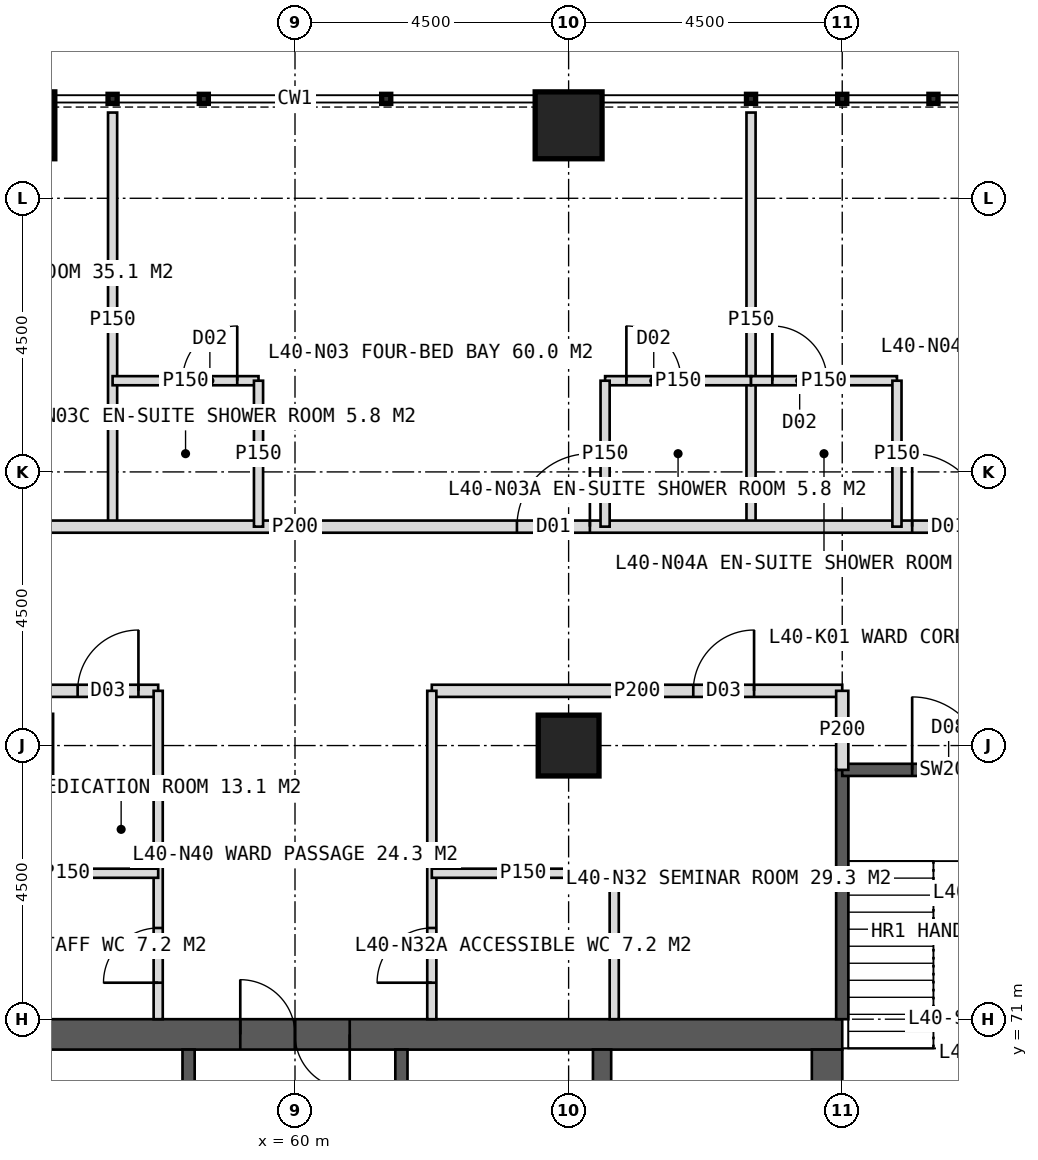
"""IFC4 building model, lengths in metres.
Left out: names, types, materials, properties, quantities, classifications, styles, units other than length and angle.
Written with IfcOpenShell. Run it as: python <this file> out.ifc"""

import sys

from ifc_helpers import new_model, si_unit, direction, frame, frame_2d, origin, origin_2d, place, context, subcontext, project, spatial, rectangle, hollow_rectangle, extrude, element, fill, save


model = new_model("IFC4")
c1 = context("Model", 3, precision=1e-05, world=origin(), true_north=direction((0.0, 1.0)))
c2 = subcontext(c1, "Body", "Model", "MODEL_VIEW")
j1 = project(units=[si_unit("LENGTHUNIT", "METRE"), si_unit("PLANEANGLEUNIT", "RADIAN")], contexts=[c1])
p1 = place(None, origin())
s1 = spatial("IfcSite", under=j1, at=p1, CompositionType="ELEMENT")
p2 = place(p1, origin())
s2 = spatial("IfcBuilding", under=s1, at=p2, CompositionType="ELEMENT")
p3 = place(p2, frame((0.0, 0.0, 168.0)))
s3 = spatial("IfcBuildingStorey", under=s2, at=p3, CompositionType="ELEMENT", Elevation=168.0)
p4 = place(p3, frame((51.0, 70.75, 0.0), z_axis=(0.0, 0.0, 1.0), x_axis=(1.0, 0.0, 0.0)))
e1 = element("IfcWall", 1, at=p4, inside=s3, PredefinedType="SHEAR", context=c2, shape_type="SweptSolid", body=[
    extrude(rectangle(XDim=18.0, YDim=0.5, at=frame_2d((9.0, 0.0))), origin(), (0.0, 0.0, 1.0), 4.0),
])
p5 = place(p4, frame((8.1, 0.0, 0.0)))
e2 = element("IfcOpeningElement", 2, at=p5, cuts=e1, PredefinedType="OPENING", context=c2, shape_type="SweptSolid", body=[
    extrude(rectangle(XDim=1.8, YDim=2.2, at=frame_2d((0.9, 1.1))), frame((0.0, 0.26, 0.0), z_axis=(0.0, -1.0, 0.0), x_axis=(1.0, 0.0, 0.0)), (0.0, 0.0, 1.0), 0.52),
])
p6 = place(p3, frame((68.75, 53.5, 0.0), z_axis=(0.0, 0.0, 1.0), x_axis=(0.0, 1.0, 0.0)))
e3 = element("IfcWall", 3, at=p6, inside=s3, PredefinedType="SHEAR", context=c2, shape_type="SweptSolid", body=[
    extrude(rectangle(XDim=17.0, YDim=0.5, at=frame_2d((8.5, 0.0))), origin(), (0.0, 0.0, 1.0), 4.0),
])
p7 = place(p6, frame((9.5, 0.0, 0.0)))
e4 = element("IfcOpeningElement", 4, at=p7, cuts=e3, PredefinedType="OPENING", context=c2, shape_type="SweptSolid", body=[
    extrude(rectangle(XDim=1.5, YDim=2.2, at=frame_2d((0.75, 1.1))), frame((0.0, 0.26, 0.0), z_axis=(0.0, -1.0, 0.0), x_axis=(1.0, 0.0, 0.0)), (0.0, 0.0, 1.0), 0.52),
])
p8 = place(p3, frame((65.05, 53.5, 0.0), z_axis=(0.0, 0.0, 1.0), x_axis=(0.0, 1.0, 0.0)))
e5 = element("IfcWall", 5, at=p8, inside=s3, PredefinedType="SHEAR", context=c2, shape_type="SweptSolid", body=[
    extrude(rectangle(XDim=17.0, YDim=0.3, at=frame_2d((8.5, 0.0))), origin(), (0.0, 0.0, 1.0), 4.0),
])
p9 = place(p3, frame((58.25, 53.5, 0.0), z_axis=(0.0, 0.0, 1.0), x_axis=(0.0, 1.0, 0.0)))
e6 = element("IfcWall", 6, at=p9, inside=s3, PredefinedType="SHEAR", context=c2, shape_type="SweptSolid", body=[
    extrude(rectangle(XDim=17.0, YDim=0.2, at=frame_2d((8.5, 0.0))), origin(), (0.0, 0.0, 1.0), 4.0),
])
p10 = place(p9, frame((1.375, 0.0, 0.0)))
e7 = element("IfcOpeningElement", 7, at=p10, cuts=e6, PredefinedType="OPENING", context=c2, shape_type="SweptSolid", body=[
    extrude(rectangle(XDim=1.4, YDim=2.2, at=frame_2d((0.7, 1.1))), frame((0.0, 0.11, 0.0), z_axis=(0.0, -1.0, 0.0), x_axis=(1.0, 0.0, 0.0)), (0.0, 0.0, 1.0), 0.22),
])
p11 = place(p9, frame((5.675, 0.0, 0.0)))
e8 = element("IfcOpeningElement", 8, at=p11, cuts=e6, PredefinedType="OPENING", context=c2, shape_type="SweptSolid", body=[
    extrude(rectangle(XDim=1.4, YDim=2.2, at=frame_2d((0.7, 1.1))), frame((0.0, 0.11, 0.0), z_axis=(0.0, -1.0, 0.0), x_axis=(1.0, 0.0, 0.0)), (0.0, 0.0, 1.0), 0.22),
])
p12 = place(p9, frame((9.925, 0.0, 0.0)))
e9 = element("IfcOpeningElement", 9, at=p12, cuts=e6, PredefinedType="OPENING", context=c2, shape_type="SweptSolid", body=[
    extrude(rectangle(XDim=1.4, YDim=2.2, at=frame_2d((0.7, 1.1))), frame((0.0, 0.11, 0.0), z_axis=(0.0, -1.0, 0.0), x_axis=(1.0, 0.0, 0.0)), (0.0, 0.0, 1.0), 0.22),
])
p13 = place(p9, frame((14.225, 0.0, 0.0)))
e10 = element("IfcOpeningElement", 10, at=p13, cuts=e6, PredefinedType="OPENING", context=c2, shape_type="SweptSolid", body=[
    extrude(rectangle(XDim=1.4, YDim=2.2, at=frame_2d((0.7, 1.1))), frame((0.0, 0.11, 0.0), z_axis=(0.0, -1.0, 0.0), x_axis=(1.0, 0.0, 0.0)), (0.0, 0.0, 1.0), 0.22),
])
p14 = place(p3, frame((61.75, 53.5, 0.0), z_axis=(0.0, 0.0, 1.0), x_axis=(0.0, 1.0, 0.0)))
e11 = element("IfcWall", 11, at=p14, inside=s3, PredefinedType="SHEAR", context=c2, shape_type="SweptSolid", body=[
    extrude(rectangle(XDim=17.0, YDim=0.2, at=frame_2d((8.5, 0.0))), origin(), (0.0, 0.0, 1.0), 4.0),
])
p15 = place(p14, frame((1.375, 0.0, 0.0)))
e12 = element("IfcOpeningElement", 12, at=p15, cuts=e11, PredefinedType="OPENING", context=c2, shape_type="SweptSolid", body=[
    extrude(rectangle(XDim=1.4, YDim=2.2, at=frame_2d((0.7, 1.1))), frame((0.0, 0.11, 0.0), z_axis=(0.0, -1.0, 0.0), x_axis=(1.0, 0.0, 0.0)), (0.0, 0.0, 1.0), 0.22),
])
p16 = place(p14, frame((5.675, 0.0, 0.0)))
e13 = element("IfcOpeningElement", 13, at=p16, cuts=e11, PredefinedType="OPENING", context=c2, shape_type="SweptSolid", body=[
    extrude(rectangle(XDim=1.4, YDim=2.2, at=frame_2d((0.7, 1.1))), frame((0.0, 0.11, 0.0), z_axis=(0.0, -1.0, 0.0), x_axis=(1.0, 0.0, 0.0)), (0.0, 0.0, 1.0), 0.22),
])
p17 = place(p14, frame((9.925, 0.0, 0.0)))
e14 = element("IfcOpeningElement", 14, at=p17, cuts=e11, PredefinedType="OPENING", context=c2, shape_type="SweptSolid", body=[
    extrude(rectangle(XDim=1.4, YDim=2.2, at=frame_2d((0.7, 1.1))), frame((0.0, 0.11, 0.0), z_axis=(0.0, -1.0, 0.0), x_axis=(1.0, 0.0, 0.0)), (0.0, 0.0, 1.0), 0.22),
])
p18 = place(p14, frame((14.225, 0.0, 0.0)))
e15 = element("IfcOpeningElement", 15, at=p18, cuts=e11, PredefinedType="OPENING", context=c2, shape_type="SweptSolid", body=[
    extrude(rectangle(XDim=1.4, YDim=2.2, at=frame_2d((0.7, 1.1))), frame((0.0, 0.11, 0.0), z_axis=(0.0, -1.0, 0.0), x_axis=(1.0, 0.0, 0.0)), (0.0, 0.0, 1.0), 0.22),
])
p19 = place(p3, frame((64.5, 75.5, 0.0), z_axis=(0.0, 0.0, 1.0), x_axis=(1.0, 0.0, 0.0)))
e16 = element("IfcColumn", 16, at=p19, inside=s3, PredefinedType="COLUMN", context=c2, shape_type="SweptSolid", body=[
    extrude(hollow_rectangle(XDim=1.0, YDim=1.0, WallThickness=0.1, at=origin_2d()), origin(), (0.0, 0.0, 1.0), 4.0),
])
for number, where, z_axis, x_axis in (
    (17, (55.5, 85.7, 0.0), (0.0, 0.0, 1.0), (1.0, 0.0, 0.0)),
    (18, (64.5, 85.7, 0.0), (0.0, 0.0, 1.0), (1.0, 0.0, 0.0)),
):
    element("IfcColumn", number, at=place(p3, frame(where, z_axis=z_axis, x_axis=x_axis)), inside=s3, PredefinedType="COLUMN", context=c2, shape_type="SweptSolid", body=[
        extrude(hollow_rectangle(XDim=1.1, YDim=1.1, WallThickness=0.1, at=origin_2d()), origin(), (0.0, 0.0, 1.0), 4.0),
    ])
for number, where, z_axis, x_axis in (
    (19, (57.0, 79.1, 0.0), (0.0, 0.0, 1.0), (0.0, 1.0, 0.0)),
    (20, (67.5, 79.1, 0.0), (0.0, 0.0, 1.0), (0.0, 1.0, 0.0)),
):
    element("IfcWall", number, at=place(p3, frame(where, z_axis=z_axis, x_axis=x_axis)), inside=s3, PredefinedType="PARTITIONING", context=c2, shape_type="SweptSolid", body=[
        extrude(rectangle(XDim=6.81, YDim=0.15, at=frame_2d((3.405, 0.0))), origin(), (0.0, 0.0, 1.0), 3.75),
    ])
p20 = place(p3, frame((42.9, 79.1, 0.0), z_axis=(0.0, 0.0, 1.0), x_axis=(1.0, 0.0, 0.0)))
e21 = element("IfcWall", 21, at=p20, inside=s3, PredefinedType="PARTITIONING", context=c2, shape_type="SweptSolid", body=[
    extrude(rectangle(XDim=34.2, YDim=0.2, at=frame_2d((17.1, 0.0))), origin(), (0.0, 0.0, 1.0), 3.75),
])
p21 = place(p20, frame((3.55, 0.0, 0.0)))
e22 = element("IfcOpeningElement", 22, at=p21, cuts=e21, PredefinedType="OPENING", context=c2, shape_type="SweptSolid", body=[
    extrude(rectangle(XDim=1.0, YDim=2.1, at=frame_2d((0.5, 1.05))), frame((0.0, 0.11, 0.0), z_axis=(0.0, -1.0, 0.0), x_axis=(1.0, 0.0, 0.0)), (0.0, 0.0, 1.0), 0.22),
])
p22 = place(p20, frame((10.75, 0.0, 0.0)))
e23 = element("IfcOpeningElement", 23, at=p22, cuts=e21, PredefinedType="OPENING", context=c2, shape_type="SweptSolid", body=[
    extrude(rectangle(XDim=1.2, YDim=2.2, at=frame_2d((0.6, 1.1))), frame((0.0, 0.11, 0.0), z_axis=(0.0, -1.0, 0.0), x_axis=(1.0, 0.0, 0.0)), (0.0, 0.0, 1.0), 0.22),
])
p23 = place(p20, frame((20.75, 0.0, 0.0)))
e24 = element("IfcOpeningElement", 24, at=p23, cuts=e21, PredefinedType="OPENING", context=c2, shape_type="SweptSolid", body=[
    extrude(rectangle(XDim=1.2, YDim=2.2, at=frame_2d((0.6, 1.1))), frame((0.0, 0.11, 0.0), z_axis=(0.0, -1.0, 0.0), x_axis=(1.0, 0.0, 0.0)), (0.0, 0.0, 1.0), 0.22),
])
p24 = place(p20, frame((27.25, 0.0, 0.0)))
e25 = element("IfcOpeningElement", 25, at=p24, cuts=e21, PredefinedType="OPENING", context=c2, shape_type="SweptSolid", body=[
    extrude(rectangle(XDim=1.2, YDim=2.2, at=frame_2d((0.6, 1.1))), frame((0.0, 0.11, 0.0), z_axis=(0.0, -1.0, 0.0), x_axis=(1.0, 0.0, 0.0)), (0.0, 0.0, 1.0), 0.22),
])
p25 = place(p3, frame((65.1, 81.5, 0.0), z_axis=(0.0, 0.0, 1.0), x_axis=(1.0, 0.0, 0.0)))
e26 = element("IfcWall", 26, at=p25, inside=s3, PredefinedType="PARTITIONING", context=c2, shape_type="SweptSolid", body=[
    extrude(rectangle(XDim=2.4, YDim=0.15, at=frame_2d((1.2, 0.0))), origin(), (0.0, 0.0, 1.0), 3.75),
])
p26 = place(p25, frame((0.35, 0.0, 0.0)))
e27 = element("IfcOpeningElement", 27, at=p26, cuts=e26, PredefinedType="OPENING", context=c2, shape_type="SweptSolid", body=[
    extrude(rectangle(XDim=0.9, YDim=2.1, at=frame_2d((0.45, 1.05))), frame((0.0, 0.085, 0.0), z_axis=(0.0, -1.0, 0.0), x_axis=(1.0, 0.0, 0.0)), (0.0, 0.0, 1.0), 0.17),
])
p27 = place(p3, frame((65.1, 79.1, 0.0), z_axis=(0.0, 0.0, 1.0), x_axis=(0.0, 1.0, 0.0)))
e28 = element("IfcWall", 28, at=p27, inside=s3, PredefinedType="PARTITIONING", context=c2, shape_type="SweptSolid", body=[
    extrude(rectangle(XDim=2.4, YDim=0.15, at=frame_2d((1.2, 0.0))), origin(), (0.0, 0.0, 1.0), 3.75),
])
p28 = place(p3, frame((57.0, 81.5, 0.0), z_axis=(0.0, 0.0, 1.0), x_axis=(1.0, 0.0, 0.0)))
e29 = element("IfcWall", 29, at=p28, inside=s3, PredefinedType="PARTITIONING", context=c2, shape_type="SweptSolid", body=[
    extrude(rectangle(XDim=2.4, YDim=0.15, at=frame_2d((1.2, 0.0))), origin(), (0.0, 0.0, 1.0), 3.75),
])
p29 = place(p28, frame((1.15, 0.0, 0.0)))
e30 = element("IfcOpeningElement", 30, at=p29, cuts=e29, PredefinedType="OPENING", context=c2, shape_type="SweptSolid", body=[
    extrude(rectangle(XDim=0.9, YDim=2.1, at=frame_2d((0.45, 1.05))), frame((0.0, 0.085, 0.0), z_axis=(0.0, -1.0, 0.0), x_axis=(1.0, 0.0, 0.0)), (0.0, 0.0, 1.0), 0.17),
])
p30 = place(p3, frame((59.4, 79.1, 0.0), z_axis=(0.0, 0.0, 1.0), x_axis=(0.0, 1.0, 0.0)))
e31 = element("IfcWall", 31, at=p30, inside=s3, PredefinedType="PARTITIONING", context=c2, shape_type="SweptSolid", body=[
    extrude(rectangle(XDim=2.4, YDim=0.15, at=frame_2d((1.2, 0.0))), origin(), (0.0, 0.0, 1.0), 3.75),
])
p31 = place(p3, frame((67.5, 81.5, 0.0), z_axis=(0.0, 0.0, 1.0), x_axis=(1.0, 0.0, 0.0)))
e32 = element("IfcWall", 32, at=p31, inside=s3, PredefinedType="PARTITIONING", context=c2, shape_type="SweptSolid", body=[
    extrude(rectangle(XDim=2.4, YDim=0.15, at=frame_2d((1.2, 0.0))), origin(), (0.0, 0.0, 1.0), 3.75),
])
p32 = place(p31, frame((0.35, 0.0, 0.0)))
e33 = element("IfcOpeningElement", 33, at=p32, cuts=e32, PredefinedType="OPENING", context=c2, shape_type="SweptSolid", body=[
    extrude(rectangle(XDim=0.9, YDim=2.1, at=frame_2d((0.45, 1.05))), frame((0.0, 0.085, 0.0), z_axis=(0.0, -1.0, 0.0), x_axis=(1.0, 0.0, 0.0)), (0.0, 0.0, 1.0), 0.17),
])
p33 = place(p3, frame((69.9, 79.1, 0.0), z_axis=(0.0, 0.0, 1.0), x_axis=(0.0, 1.0, 0.0)))
e34 = element("IfcWall", 34, at=p33, inside=s3, PredefinedType="PARTITIONING", context=c2, shape_type="SweptSolid", body=[
    extrude(rectangle(XDim=2.4, YDim=0.15, at=frame_2d((1.2, 0.0))), origin(), (0.0, 0.0, 1.0), 3.75),
])
p34 = place(p3, frame((45.6, 76.4, 0.0), z_axis=(0.0, 0.0, 1.0), x_axis=(1.0, 0.0, 0.0)))
e35 = element("IfcWall", 35, at=p34, inside=s3, PredefinedType="PARTITIONING", context=c2, shape_type="SweptSolid", body=[
    extrude(rectangle(XDim=12.15, YDim=0.2, at=frame_2d((6.075, 0.0))), origin(), (0.0, 0.0, 1.0), 3.75),
])
p35 = place(p34, frame((6.4, 0.0, 0.0)))
e36 = element("IfcOpeningElement", 36, at=p35, cuts=e35, PredefinedType="OPENING", context=c2, shape_type="SweptSolid", body=[
    extrude(rectangle(XDim=1.0, YDim=2.1, at=frame_2d((0.5, 1.05))), frame((0.0, 0.11, 0.0), z_axis=(0.0, -1.0, 0.0), x_axis=(1.0, 0.0, 0.0)), (0.0, 0.0, 1.0), 0.22),
])
p36 = place(p34, frame((10.825, 0.0, 0.0)))
e37 = element("IfcOpeningElement", 37, at=p36, cuts=e35, PredefinedType="OPENING", context=c2, shape_type="SweptSolid", body=[
    extrude(rectangle(XDim=1.0, YDim=2.1, at=frame_2d((0.5, 1.05))), frame((0.0, 0.11, 0.0), z_axis=(0.0, -1.0, 0.0), x_axis=(1.0, 0.0, 0.0)), (0.0, 0.0, 1.0), 0.22),
])
p37 = place(p3, frame((62.25, 76.4, 0.0), z_axis=(0.0, 0.0, 1.0), x_axis=(1.0, 0.0, 0.0)))
e38 = element("IfcWall", 38, at=p37, inside=s3, PredefinedType="PARTITIONING", context=c2, shape_type="SweptSolid", body=[
    extrude(rectangle(XDim=6.75, YDim=0.2, at=frame_2d((3.375, 0.0))), origin(), (0.0, 0.0, 1.0), 3.75),
])
p38 = place(p37, frame((4.3, 0.0, 0.0)))
e39 = element("IfcOpeningElement", 39, at=p38, cuts=e38, PredefinedType="OPENING", context=c2, shape_type="SweptSolid", body=[
    extrude(rectangle(XDim=1.0, YDim=2.1, at=frame_2d((0.5, 1.05))), frame((0.0, 0.11, 0.0), z_axis=(0.0, -1.0, 0.0), x_axis=(1.0, 0.0, 0.0)), (0.0, 0.0, 1.0), 0.22),
])
p39 = place(p3, frame((57.75, 71.0, 0.0), z_axis=(0.0, 0.0, 1.0), x_axis=(0.0, 1.0, 0.0)))
e40 = element("IfcWall", 40, at=p39, inside=s3, PredefinedType="PARTITIONING", context=c2, shape_type="SweptSolid", body=[
    extrude(rectangle(XDim=5.4, YDim=0.15, at=frame_2d((2.7, 0.0))), origin(), (0.0, 0.0, 1.0), 3.75),
])
p40 = place(p39, frame((0.6, 0.0, 0.0)))
e41 = element("IfcOpeningElement", 41, at=p40, cuts=e40, PredefinedType="OPENING", context=c2, shape_type="SweptSolid", body=[
    extrude(rectangle(XDim=0.9, YDim=2.1, at=frame_2d((0.45, 1.05))), frame((0.0, 0.085, 0.0), z_axis=(0.0, -1.0, 0.0), x_axis=(1.0, 0.0, 0.0)), (0.0, 0.0, 1.0), 0.17),
])
p41 = place(p3, frame((62.25, 71.0, 0.0), z_axis=(0.0, 0.0, 1.0), x_axis=(0.0, 1.0, 0.0)))
e42 = element("IfcWall", 42, at=p41, inside=s3, PredefinedType="PARTITIONING", context=c2, shape_type="SweptSolid", body=[
    extrude(rectangle(XDim=5.4, YDim=0.15, at=frame_2d((2.7, 0.0))), origin(), (0.0, 0.0, 1.0), 3.75),
])
p42 = place(p41, frame((0.6, 0.0, 0.0)))
e43 = element("IfcOpeningElement", 43, at=p42, cuts=e42, PredefinedType="OPENING", context=c2, shape_type="SweptSolid", body=[
    extrude(rectangle(XDim=0.9, YDim=2.1, at=frame_2d((0.45, 1.05))), frame((0.0, 0.085, 0.0), z_axis=(0.0, -1.0, 0.0), x_axis=(1.0, 0.0, 0.0)), (0.0, 0.0, 1.0), 0.17),
])
for number, where, z_axis, x_axis in (
    (44, (54.75, 73.4, 0.0), (0.0, 0.0, 1.0), (1.0, 0.0, 0.0)),
    (45, (62.25, 73.4, 0.0), (0.0, 0.0, 1.0), (1.0, 0.0, 0.0)),
):
    element("IfcWall", number, at=place(p3, frame(where, z_axis=z_axis, x_axis=x_axis)), inside=s3, PredefinedType="PARTITIONING", context=c2, shape_type="SweptSolid", body=[
        extrude(rectangle(XDim=3.0, YDim=0.15, at=frame_2d((1.5, 0.0))), origin(), (0.0, 0.0, 1.0), 3.75),
    ])
p43 = place(p3, frame((65.25, 71.0, 0.0), z_axis=(0.0, 0.0, 1.0), x_axis=(0.0, 1.0, 0.0)))
e46 = element("IfcWall", 46, at=p43, inside=s3, PredefinedType="PARTITIONING", context=c2, shape_type="SweptSolid", body=[
    extrude(rectangle(XDim=2.4, YDim=0.15, at=frame_2d((1.2, 0.0))), origin(), (0.0, 0.0, 1.0), 3.75),
])
p44 = place(p3, frame((69.0, 71.0, 0.0), z_axis=(0.0, 0.0, 1.0), x_axis=(0.0, 1.0, 0.0)))
e47 = element("IfcWall", 47, at=p44, inside=s3, PredefinedType="SOLIDWALL", context=c2, shape_type="SweptSolid", body=[
    extrude(rectangle(XDim=4.1, YDim=0.2, at=frame_2d((2.05, 0.0))), origin(), (0.0, 0.0, 1.0), 3.75),
])
p45 = place(p3, frame((69.0, 75.1, 0.0), z_axis=(0.0, 0.0, 1.0), x_axis=(1.0, 0.0, 0.0)))
e48 = element("IfcWall", 48, at=p45, inside=s3, PredefinedType="SOLIDWALL", context=c2, shape_type="SweptSolid", body=[
    extrude(rectangle(XDim=3.5, YDim=0.2, at=frame_2d((1.75, 0.0))), origin(), (0.0, 0.0, 1.0), 3.75),
])
p46 = place(p45, frame((1.15, 0.0, 0.0)))
e49 = element("IfcOpeningElement", 49, at=p46, cuts=e48, PredefinedType="OPENING", context=c2, shape_type="SweptSolid", body=[
    extrude(rectangle(XDim=1.2, YDim=2.1, at=frame_2d((0.6, 1.05))), frame((0.0, 0.11, 0.0), z_axis=(0.0, -1.0, 0.0), x_axis=(1.0, 0.0, 0.0)), (0.0, 0.0, 1.0), 0.22),
])
p47 = place(p3, frame((69.0, 75.1, 0.0), z_axis=(0.0, 0.0, 1.0), x_axis=(0.0, 1.0, 0.0)))
e50 = element("IfcWall", 50, at=p47, inside=s3, PredefinedType="PARTITIONING", context=c2, shape_type="SweptSolid", body=[
    extrude(rectangle(XDim=1.3, YDim=0.2, at=frame_2d((0.65, 0.0))), origin(), (0.0, 0.0, 1.0), 3.75),
])
p48 = place(p23, origin())
e51 = element("IfcDoor", 51, at=p48, inside=s3, OperationType="SINGLE_SWING_RIGHT", PredefinedType="DOOR", context=c2, shape_type="SweptSolid", body=[
    extrude(rectangle(XDim=1.2, YDim=2.2, at=frame_2d((0.6, 1.1))), frame((0.0, 0.025, 0.0), z_axis=(0.0, -1.0, 0.0), x_axis=(1.0, 0.0, 0.0)), (0.0, 0.0, 1.0), 0.05),
])
fill(e24, e51)
p49 = place(p26, origin())
e52 = element("IfcDoor", 52, at=p49, inside=s3, OperationType="SINGLE_SWING_LEFT", PredefinedType="DOOR", context=c2, shape_type="SweptSolid", body=[
    extrude(rectangle(XDim=0.9, YDim=2.1, at=frame_2d((0.45, 1.05))), frame((0.0, 0.025, 0.0), z_axis=(0.0, -1.0, 0.0), x_axis=(1.0, 0.0, 0.0)), (0.0, 0.0, 1.0), 0.05),
])
fill(e27, e52)
p50 = place(p29, origin())
e53 = element("IfcDoor", 53, at=p50, inside=s3, OperationType="SINGLE_SWING_RIGHT", PredefinedType="DOOR", context=c2, shape_type="SweptSolid", body=[
    extrude(rectangle(XDim=0.9, YDim=2.1, at=frame_2d((0.45, 1.05))), frame((0.0, 0.025, 0.0), z_axis=(0.0, -1.0, 0.0), x_axis=(1.0, 0.0, 0.0)), (0.0, 0.0, 1.0), 0.05),
])
fill(e30, e53)
p51 = place(p24, origin())
e54 = element("IfcDoor", 54, at=p51, inside=s3, OperationType="SINGLE_SWING_LEFT", PredefinedType="DOOR", context=c2, shape_type="SweptSolid", body=[
    extrude(rectangle(XDim=1.2, YDim=2.2, at=frame_2d((0.6, 1.1))), frame((0.0, 0.025, 0.0), z_axis=(0.0, -1.0, 0.0), x_axis=(1.0, 0.0, 0.0)), (0.0, 0.0, 1.0), 0.05),
])
fill(e25, e54)
p52 = place(p32, origin())
e55 = element("IfcDoor", 55, at=p52, inside=s3, OperationType="SINGLE_SWING_LEFT", PredefinedType="DOOR", context=c2, shape_type="SweptSolid", body=[
    extrude(rectangle(XDim=0.9, YDim=2.1, at=frame_2d((0.45, 1.05))), frame((0.0, 0.025, 0.0), z_axis=(0.0, -1.0, 0.0), x_axis=(1.0, 0.0, 0.0)), (0.0, 0.0, 1.0), 0.05),
])
fill(e33, e55)
p53 = place(p40, origin())
e56 = element("IfcDoor", 56, at=p53, inside=s3, OperationType="SINGLE_SWING_LEFT", PredefinedType="DOOR", context=c2, shape_type="SweptSolid", body=[
    extrude(rectangle(XDim=0.9, YDim=2.1, at=frame_2d((0.45, 1.05))), frame((0.0, 0.025, 0.0), z_axis=(0.0, -1.0, 0.0), x_axis=(1.0, 0.0, 0.0)), (0.0, 0.0, 1.0), 0.05),
])
fill(e41, e56)
p54 = place(p36, origin())
e57 = element("IfcDoor", 57, at=p54, inside=s3, OperationType="SINGLE_SWING_RIGHT", PredefinedType="DOOR", context=c2, shape_type="SweptSolid", body=[
    extrude(rectangle(XDim=1.0, YDim=2.1, at=frame_2d((0.5, 1.05))), frame((0.0, 0.025, 0.0), z_axis=(0.0, -1.0, 0.0), x_axis=(1.0, 0.0, 0.0)), (0.0, 0.0, 1.0), 0.05),
])
fill(e37, e57)
p55 = place(p42, origin())
e58 = element("IfcDoor", 58, at=p55, inside=s3, OperationType="SINGLE_SWING_LEFT", PredefinedType="DOOR", context=c2, shape_type="SweptSolid", body=[
    extrude(rectangle(XDim=0.9, YDim=2.1, at=frame_2d((0.45, 1.05))), frame((0.0, 0.025, 0.0), z_axis=(0.0, -1.0, 0.0), x_axis=(1.0, 0.0, 0.0)), (0.0, 0.0, 1.0), 0.05),
])
fill(e43, e58)
p56 = place(p38, origin())
e59 = element("IfcDoor", 59, at=p56, inside=s3, OperationType="SINGLE_SWING_RIGHT", PredefinedType="DOOR", context=c2, shape_type="SweptSolid", body=[
    extrude(rectangle(XDim=1.0, YDim=2.1, at=frame_2d((0.5, 1.05))), frame((0.0, 0.025, 0.0), z_axis=(0.0, -1.0, 0.0), x_axis=(1.0, 0.0, 0.0)), (0.0, 0.0, 1.0), 0.05),
])
fill(e39, e59)
p57 = place(p5, origin())
e60 = element("IfcDoor", 60, at=p57, inside=s3, OperationType="DOUBLE_DOOR_SINGLE_SWING", PredefinedType="DOOR", context=c2, shape_type="SweptSolid", body=[
    extrude(rectangle(XDim=1.8, YDim=2.2, at=frame_2d((0.9, 1.1))), frame((0.0, 0.025, 0.0), z_axis=(0.0, -1.0, 0.0), x_axis=(1.0, 0.0, 0.0)), (0.0, 0.0, 1.0), 0.05),
])
fill(e2, e60)
p58 = place(p46, origin())
e61 = element("IfcDoor", 61, at=p58, inside=s3, OperationType="SINGLE_SWING_LEFT", PredefinedType="DOOR", context=c2, shape_type="SweptSolid", body=[
    extrude(rectangle(XDim=1.2, YDim=2.1, at=frame_2d((0.6, 1.05))), frame((0.0, 0.025, 0.0), z_axis=(0.0, -1.0, 0.0), x_axis=(1.0, 0.0, 0.0)), (0.0, 0.0, 1.0), 0.05),
])
fill(e49, e61)
save(model, sys.argv[1])
